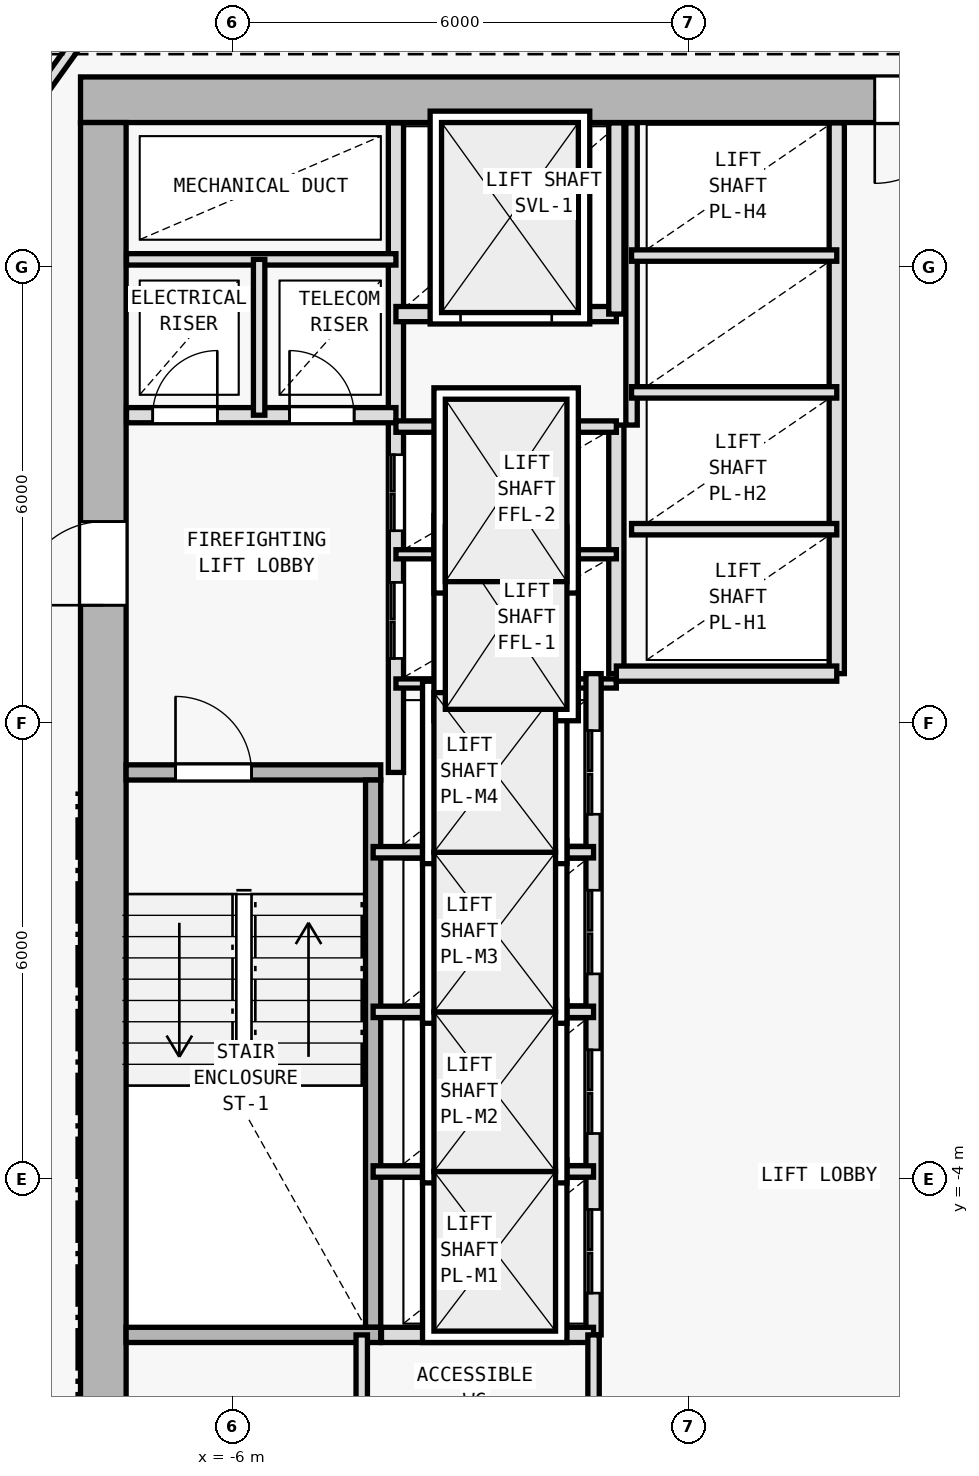
"""IFC4 building model, lengths in metres.
Left out: names, types, materials, properties, quantities, classifications, styles, units other than length and angle.
Written with IfcOpenShell. Run it as: python <this file> out.ifc"""

import sys

from ifc_helpers import new_model, si_unit, direction, frame, frame_2d, origin, origin_2d, place, context, subcontext, project, spatial, rectangle, i_section, extrude, element, fill, save


model = new_model("IFC4")
c1 = context("Model", 3, precision=1e-05, world=origin(), true_north=direction((0.0, 1.0)))
c2 = subcontext(c1, "Body", "Model", "MODEL_VIEW")
j1 = project(units=[si_unit("LENGTHUNIT", "METRE"), si_unit("PLANEANGLEUNIT", "RADIAN")], contexts=[c1])
p1 = place(None, origin())
s1 = spatial("IfcSite", under=j1, at=p1, CompositionType="ELEMENT")
p2 = place(p1, origin())
s2 = spatial("IfcBuilding", under=s1, at=p2, CompositionType="ELEMENT")
p3 = place(p2, frame((0.0, 0.0, 111.3)))
s3 = spatial("IfcBuildingStorey", under=s2, at=p3, CompositionType="ELEMENT", Elevation=111.3)
for number, where, z_axis, x_axis in (
    (1, (-7.7, 10.2, 0.0), (0.0, 0.0, 1.0), (1.0, 0.0, 0.0)),
    (2, (-7.7, 2.0, 0.0), (0.0, 0.0, 1.0), (1.0, 0.0, 0.0)),
):
    element("IfcColumn", number, at=place(p3, frame(where, z_axis=z_axis, x_axis=x_axis)), inside=s3, PredefinedType="COLUMN", context=c2, shape_type="SweptSolid", body=[
        extrude(i_section(OverallWidth=0.409, OverallDepth=0.425, WebThickness=0.021, FlangeThickness=0.034, FilletRadius=0.015, at=origin_2d()), origin(), (0.0, 0.0, 1.0), 3.6),
    ])
p4 = place(p3, frame((8.0, 10.2, 0.0), z_axis=(0.0, 0.0, 1.0), x_axis=(-1.0, 0.0, 0.0)))
e3 = element("IfcWall", 3, at=p4, inside=s3, PredefinedType="SHEAR", context=c2, shape_type="SweptSolid", body=[
    extrude(rectangle(XDim=16.0, YDim=0.6, at=frame_2d((8.0, 0.0))), origin(), (0.0, 0.0, 1.0), 3.35),
])
p5 = place(p4, frame((4.45, 0.0, 0.0)))
e4 = element("IfcOpeningElement", 4, at=p5, cuts=e3, PredefinedType="OPENING", context=c2, shape_type="SweptSolid", body=[
    extrude(rectangle(XDim=1.1, YDim=2.15, at=frame_2d((0.55, 1.075))), frame((0.0, 0.31, 0.0), z_axis=(0.0, -1.0, 0.0), x_axis=(1.0, 0.0, 0.0)), (0.0, 0.0, 1.0), 0.62),
])
p6 = place(p3, frame((-7.7, -9.1, 0.0), z_axis=(0.0, 0.0, 1.0), x_axis=(0.0, 1.0, 0.0)))
e5 = element("IfcWall", 5, at=p6, inside=s3, PredefinedType="SHEAR", context=c2, shape_type="SweptSolid", body=[
    extrude(rectangle(XDim=19.0, YDim=0.6, at=frame_2d((9.5, 0.0))), origin(), (0.0, 0.0, 1.0), 3.35),
])
p7 = place(p6, frame((12.65, 0.0, 0.0)))
e6 = element("IfcOpeningElement", 6, at=p7, cuts=e5, PredefinedType="OPENING", context=c2, shape_type="SweptSolid", body=[
    extrude(rectangle(XDim=1.1, YDim=2.15, at=frame_2d((0.55, 1.075))), frame((0.0, 0.31, 0.0), z_axis=(0.0, -1.0, 0.0), x_axis=(1.0, 0.0, 0.0)), (0.0, 0.0, 1.0), 0.62),
])
p8 = place(p3, frame((-7.4, 1.35, 0.0), z_axis=(0.0, 0.0, 1.0), x_axis=(1.0, 0.0, 0.0)))
e7 = element("IfcWall", 7, at=p8, inside=s3, PredefinedType="SOLIDWALL", context=c2, shape_type="SweptSolid", body=[
    extrude(rectangle(XDim=3.35, YDim=0.2, at=frame_2d((1.675, 0.0))), origin(), (0.0, 0.0, 1.0), 3.35),
])
p9 = place(p8, frame((0.65, 0.0, 0.0)))
e8 = element("IfcOpeningElement", 8, at=p9, cuts=e7, PredefinedType="OPENING", context=c2, shape_type="SweptSolid", body=[
    extrude(rectangle(XDim=1.0, YDim=2.15, at=frame_2d((0.5, 1.075))), frame((0.0, 0.11, 0.0), z_axis=(0.0, -1.0, 0.0), x_axis=(1.0, 0.0, 0.0)), (0.0, 0.0, 1.0), 0.22),
])
p10 = place(p3, frame((-4.15, -5.95, 0.0), z_axis=(0.0, 0.0, 1.0), x_axis=(0.0, 1.0, 0.0)))
e9 = element("IfcWall", 9, at=p10, inside=s3, PredefinedType="SOLIDWALL", context=c2, shape_type="SweptSolid", body=[
    extrude(rectangle(XDim=7.2, YDim=0.2, at=frame_2d((3.6, 0.0))), origin(), (0.0, 0.0, 1.0), 3.35),
])
p11 = place(p3, frame((-3.85, 1.35, 0.0), z_axis=(0.0, 0.0, 1.0), x_axis=(0.0, 1.0, 0.0)))
e10 = element("IfcWall", 10, at=p11, inside=s3, PredefinedType="SOLIDWALL", context=c2, shape_type="SweptSolid", body=[
    extrude(rectangle(XDim=8.545, YDim=0.2, at=frame_2d((4.272, 0.0))), origin(), (0.0, 0.0, 1.0), 3.35),
])
p12 = place(p11, frame((1.5, 0.0, 0.0)))
e11 = element("IfcOpeningElement", 11, at=p12, cuts=e10, PredefinedType="OPENING", context=c2, shape_type="SweptSolid", body=[
    extrude(rectangle(XDim=1.0, YDim=2.15, at=frame_2d((0.5, 1.075))), frame((0.0, 0.11, 0.0), z_axis=(0.0, -1.0, 0.0), x_axis=(1.0, 0.0, 0.0)), (0.0, 0.0, 1.0), 0.22),
])
p13 = place(p11, frame((3.18, 0.0, 0.0)))
e12 = element("IfcOpeningElement", 12, at=p13, cuts=e10, PredefinedType="OPENING", context=c2, shape_type="SweptSolid", body=[
    extrude(rectangle(XDim=1.0, YDim=2.15, at=frame_2d((0.5, 1.075))), frame((0.0, 0.11, 0.0), z_axis=(0.0, -1.0, 0.0), x_axis=(1.0, 0.0, 0.0)), (0.0, 0.0, 1.0), 0.22),
])
p14 = place(p3, frame((-7.395, 6.05, 0.0), z_axis=(0.0, 0.0, 1.0), x_axis=(1.0, 0.0, 0.0)))
e13 = element("IfcWall", 13, at=p14, inside=s3, PredefinedType="SOLIDWALL", context=c2, shape_type="SweptSolid", body=[
    extrude(rectangle(XDim=3.545, YDim=0.2, at=frame_2d((1.772, 0.0))), origin(), (0.0, 0.0, 1.0), 3.35),
])
p15 = place(p14, frame((0.345, 0.0, 0.0)))
e14 = element("IfcOpeningElement", 14, at=p15, cuts=e13, PredefinedType="OPENING", context=c2, shape_type="SweptSolid", body=[
    extrude(rectangle(XDim=0.85, YDim=2.1, at=frame_2d((0.425, 1.05))), frame((0.0, 0.11, 0.0), z_axis=(0.0, -1.0, 0.0), x_axis=(1.0, 0.0, 0.0)), (0.0, 0.0, 1.0), 0.22),
])
p16 = place(p14, frame((2.145, 0.0, 0.0)))
e15 = element("IfcOpeningElement", 15, at=p16, cuts=e13, PredefinedType="OPENING", context=c2, shape_type="SweptSolid", body=[
    extrude(rectangle(XDim=0.85, YDim=2.1, at=frame_2d((0.425, 1.05))), frame((0.0, 0.11, 0.0), z_axis=(0.0, -1.0, 0.0), x_axis=(1.0, 0.0, 0.0)), (0.0, 0.0, 1.0), 0.22),
])
p17 = place(p3, frame((-7.395, 8.1, 0.0), z_axis=(0.0, 0.0, 1.0), x_axis=(1.0, 0.0, 0.0)))
e16 = element("IfcWall", 16, at=p17, inside=s3, PredefinedType="PARTITIONING", context=c2, shape_type="SweptSolid", body=[
    extrude(rectangle(XDim=3.545, YDim=0.15, at=frame_2d((1.772, 0.0))), origin(), (0.0, 0.0, 1.0), 3.35),
])
p18 = place(p3, frame((-5.65, 6.05, 0.0), z_axis=(0.0, 0.0, 1.0), x_axis=(0.0, 1.0, 0.0)))
e17 = element("IfcWall", 17, at=p18, inside=s3, PredefinedType="PARTITIONING", context=c2, shape_type="SweptSolid", body=[
    extrude(rectangle(XDim=2.05, YDim=0.15, at=frame_2d((1.025, 0.0))), origin(), (0.0, 0.0, 1.0), 3.35),
])
p19 = place(p3, frame((-0.95, 2.65, 0.0), z_axis=(0.0, 0.0, 1.0), x_axis=(0.0, 1.0, 0.0)))
e18 = element("IfcWall", 18, at=p19, inside=s3, PredefinedType="SOLIDWALL", context=c2, shape_type="SweptSolid", body=[
    extrude(rectangle(XDim=3.27, YDim=0.2, at=frame_2d((1.635, 0.0))), origin(), (0.0, 0.0, 1.0), 3.35),
])
for number, where, z_axis, x_axis in (
    (19, (-3.85, 2.52, 0.0), (0.0, 0.0, 1.0), (1.0, 0.0, 0.0)),
    (20, (-3.85, 4.22, 0.0), (0.0, 0.0, 1.0), (1.0, 0.0, 0.0)),
):
    element("IfcWall", number, at=place(p3, frame(where, z_axis=z_axis, x_axis=x_axis)), inside=s3, PredefinedType="PARTITIONING", context=c2, shape_type="SweptSolid", body=[
        extrude(rectangle(XDim=2.9, YDim=0.12, at=frame_2d((1.45, 0.0))), origin(), (0.0, 0.0, 1.0), 3.35),
    ])
p20 = place(p3, frame((-3.85, 5.9, 0.0), z_axis=(0.0, 0.0, 1.0), x_axis=(1.0, 0.0, 0.0)))
e21 = element("IfcWall", 21, at=p20, inside=s3, PredefinedType="PARTITIONING", context=c2, shape_type="SweptSolid", body=[
    extrude(rectangle(XDim=2.9, YDim=0.15, at=frame_2d((1.45, 0.0))), origin(), (0.0, 0.0, 1.0), 3.35),
])
p21 = place(p3, frame((-3.85, 7.38, 0.0), z_axis=(0.0, 0.0, 1.0), x_axis=(1.0, 0.0, 0.0)))
e22 = element("IfcWall", 22, at=p21, inside=s3, PredefinedType="SOLIDWALL", context=c2, shape_type="SweptSolid", body=[
    extrude(rectangle(XDim=2.9, YDim=0.2, at=frame_2d((1.45, 0.0))), origin(), (0.0, 0.0, 1.0), 3.35),
])
p22 = place(p21, frame((0.85, 0.0, 0.0)))
e23 = element("IfcOpeningElement", 23, at=p22, cuts=e22, PredefinedType="OPENING", context=c2, shape_type="SweptSolid", body=[
    extrude(rectangle(XDim=1.2, YDim=2.2, at=frame_2d((0.6, 1.1))), frame((0.0, 0.11, 0.0), z_axis=(0.0, -1.0, 0.0), x_axis=(1.0, 0.0, 0.0)), (0.0, 0.0, 1.0), 0.22),
])
p23 = place(p3, frame((-0.95, 7.38, 0.0), z_axis=(0.0, 0.0, 1.0), x_axis=(0.0, 1.0, 0.0)))
e24 = element("IfcWall", 24, at=p23, inside=s3, PredefinedType="SOLIDWALL", context=c2, shape_type="SweptSolid", body=[
    extrude(rectangle(XDim=2.515, YDim=0.2, at=frame_2d((1.258, 0.0))), origin(), (0.0, 0.0, 1.0), 3.35),
])
p24 = place(p3, frame((-1.25, -6.05, 0.0), z_axis=(0.0, 0.0, 1.0), x_axis=(0.0, 1.0, 0.0)))
e25 = element("IfcWall", 25, at=p24, inside=s3, PredefinedType="SOLIDWALL", context=c2, shape_type="SweptSolid", body=[
    extrude(rectangle(XDim=8.7, YDim=0.2, at=frame_2d((4.35, 0.0))), origin(), (0.0, 0.0, 1.0), 3.35),
])
p25 = place(p24, frame((0.55, 0.0, 0.0)))
e26 = element("IfcOpeningElement", 26, at=p25, cuts=e25, PredefinedType="OPENING", context=c2, shape_type="SweptSolid", body=[
    extrude(rectangle(XDim=1.1, YDim=2.15, at=frame_2d((0.55, 1.075))), frame((0.0, 0.11, 0.0), z_axis=(0.0, -1.0, 0.0), x_axis=(1.0, 0.0, 0.0)), (0.0, 0.0, 1.0), 0.22),
])
p26 = place(p24, frame((2.65, 0.0, 0.0)))
e27 = element("IfcOpeningElement", 27, at=p26, cuts=e25, PredefinedType="OPENING", context=c2, shape_type="SweptSolid", body=[
    extrude(rectangle(XDim=1.1, YDim=2.15, at=frame_2d((0.55, 1.075))), frame((0.0, 0.11, 0.0), z_axis=(0.0, -1.0, 0.0), x_axis=(1.0, 0.0, 0.0)), (0.0, 0.0, 1.0), 0.22),
])
p27 = place(p24, frame((4.75, 0.0, 0.0)))
e28 = element("IfcOpeningElement", 28, at=p27, cuts=e25, PredefinedType="OPENING", context=c2, shape_type="SweptSolid", body=[
    extrude(rectangle(XDim=1.1, YDim=2.15, at=frame_2d((0.55, 1.075))), frame((0.0, 0.11, 0.0), z_axis=(0.0, -1.0, 0.0), x_axis=(1.0, 0.0, 0.0)), (0.0, 0.0, 1.0), 0.22),
])
p28 = place(p24, frame((6.85, 0.0, 0.0)))
e29 = element("IfcOpeningElement", 29, at=p28, cuts=e25, PredefinedType="OPENING", context=c2, shape_type="SweptSolid", body=[
    extrude(rectangle(XDim=1.1, YDim=2.15, at=frame_2d((0.55, 1.075))), frame((0.0, 0.11, 0.0), z_axis=(0.0, -1.0, 0.0), x_axis=(1.0, 0.0, 0.0)), (0.0, 0.0, 1.0), 0.22),
])
for number, where, z_axis, x_axis in (
    (30, (-4.15, -3.9, 0.0), (0.0, 0.0, 1.0), (1.0, 0.0, 0.0)),
    (31, (-4.15, -1.8, 0.0), (0.0, 0.0, 1.0), (1.0, 0.0, 0.0)),
    (32, (-4.15, 0.3, 0.0), (0.0, 0.0, 1.0), (1.0, 0.0, 0.0)),
):
    element("IfcWall", number, at=place(p3, frame(where, z_axis=z_axis, x_axis=x_axis)), inside=s3, PredefinedType="PARTITIONING", context=c2, shape_type="SweptSolid", body=[
        extrude(rectangle(XDim=2.9, YDim=0.15, at=frame_2d((1.45, 0.0))), origin(), (0.0, 0.0, 1.0), 3.35),
    ])
p29 = place(p3, frame((1.95, 2.65, 0.0), z_axis=(0.0, 0.0, 1.0), x_axis=(0.0, 1.0, 0.0)))
e33 = element("IfcWall", 33, at=p29, inside=s3, PredefinedType="SOLIDWALL", context=c2, shape_type="SweptSolid", body=[
    extrude(rectangle(XDim=7.245, YDim=0.2, at=frame_2d((3.623, 0.0))), origin(), (0.0, 0.0, 1.0), 3.35),
])
p30 = place(p3, frame((-0.95, 2.65, 0.0), z_axis=(0.0, 0.0, 1.0), x_axis=(1.0, 0.0, 0.0)))
e34 = element("IfcWall", 34, at=p30, inside=s3, PredefinedType="SOLIDWALL", context=c2, shape_type="SweptSolid", body=[
    extrude(rectangle(XDim=2.9, YDim=0.2, at=frame_2d((1.45, 0.0))), origin(), (0.0, 0.0, 1.0), 3.35),
])
p31 = place(p3, frame((-0.75, 5.92, 0.0), z_axis=(0.0, 0.0, 1.0), x_axis=(0.0, 1.0, 0.0)))
e35 = element("IfcWall", 35, at=p31, inside=s3, PredefinedType="PARTITIONING", context=c2, shape_type="SweptSolid", body=[
    extrude(rectangle(XDim=3.975, YDim=0.15, at=frame_2d((1.988, 0.0))), origin(), (0.0, 0.0, 1.0), 3.35),
])
for number, where, z_axis, x_axis in (
    (36, (-0.75, 4.55, 0.0), (0.0, 0.0, 1.0), (1.0, 0.0, 0.0)),
    (37, (-0.75, 6.35, 0.0), (0.0, 0.0, 1.0), (1.0, 0.0, 0.0)),
    (38, (-0.75, 8.15, 0.0), (0.0, 0.0, 1.0), (1.0, 0.0, 0.0)),
):
    element("IfcWall", number, at=place(p3, frame(where, z_axis=z_axis, x_axis=x_axis)), inside=s3, PredefinedType="PARTITIONING", context=c2, shape_type="SweptSolid", body=[
        extrude(rectangle(XDim=2.7, YDim=0.15, at=frame_2d((1.35, 0.0))), origin(), (0.0, 0.0, 1.0), 3.35),
    ])
p32 = place(p3, frame((-7.4, -6.05, 0.0), z_axis=(0.0, 0.0, 1.0), x_axis=(1.0, 0.0, 0.0)))
e39 = element("IfcWall", 39, at=p32, inside=s3, PredefinedType="SOLIDWALL", context=c2, shape_type="SweptSolid", body=[
    extrude(rectangle(XDim=3.35, YDim=0.2, at=frame_2d((1.675, 0.0))), origin(), (0.0, 0.0, 1.0), 3.35),
])
p33 = place(p3, frame((-4.04, -6.05, 0.0), z_axis=(0.0, 0.0, 1.0), x_axis=(1.0, 0.0, 0.0)))
e40 = element("IfcWall", 40, at=p33, inside=s3, PredefinedType="SOLIDWALL", context=c2, shape_type="SweptSolid", body=[
    extrude(rectangle(XDim=2.79, YDim=0.2, at=frame_2d((1.395, 0.0))), origin(), (0.0, 0.0, 1.0), 3.35),
])
p34 = place(p3, frame((-1.25, -9.095, 0.0), z_axis=(0.0, 0.0, 1.0), x_axis=(0.0, 1.0, 0.0)))
e41 = element("IfcWall", 41, at=p34, inside=s3, PredefinedType="PARTITIONING", context=c2, shape_type="SweptSolid", body=[
    extrude(rectangle(XDim=3.045, YDim=0.15, at=frame_2d((1.522, 0.0))), origin(), (0.0, 0.0, 1.0), 3.35),
])
p35 = place(p34, frame((0.845, 0.0, 0.0)))
e42 = element("IfcOpeningElement", 42, at=p35, cuts=e41, PredefinedType="OPENING", context=c2, shape_type="SweptSolid", body=[
    extrude(rectangle(XDim=0.95, YDim=2.1, at=frame_2d((0.475, 1.05))), frame((0.0, 0.085, 0.0), z_axis=(0.0, -1.0, 0.0), x_axis=(1.0, 0.0, 0.0)), (0.0, 0.0, 1.0), 0.17),
])
p36 = place(p3, frame((-4.3, -9.095, 0.0), z_axis=(0.0, 0.0, 1.0), x_axis=(0.0, 1.0, 0.0)))
e43 = element("IfcWall", 43, at=p36, inside=s3, PredefinedType="PARTITIONING", context=c2, shape_type="SweptSolid", body=[
    extrude(rectangle(XDim=3.045, YDim=0.15, at=frame_2d((1.522, 0.0))), origin(), (0.0, 0.0, 1.0), 3.35),
])
p37 = place(p36, frame((0.845, 0.0, 0.0)))
e44 = element("IfcOpeningElement", 44, at=p37, cuts=e43, PredefinedType="OPENING", context=c2, shape_type="SweptSolid", body=[
    extrude(rectangle(XDim=0.9, YDim=2.1, at=frame_2d((0.45, 1.05))), frame((0.0, 0.085, 0.0), z_axis=(0.0, -1.0, 0.0), x_axis=(1.0, 0.0, 0.0)), (0.0, 0.0, 1.0), 0.17),
])
p38 = place(p3, frame((-9.86, 8.426, 0.0), z_axis=(0.0, 0.0, 1.0), x_axis=(0.582449511476, 0.812866881218, 0.0)))
e45 = element("IfcWall", 45, at=p38, inside=s3, PredefinedType="PARTITIONING", context=c2, shape_type="SweptSolid", body=[
    extrude(rectangle(XDim=4.84, YDim=0.15, at=frame_2d((2.42, 0.0))), origin(), (0.0, 0.0, 1.0), 2.825),
])
p39 = place(p7, origin())
e46 = element("IfcDoor", 46, at=p39, inside=s3, OperationType="SINGLE_SWING_LEFT", PredefinedType="DOOR", context=c2, shape_type="SweptSolid", body=[
    extrude(rectangle(XDim=1.1, YDim=2.15, at=frame_2d((0.55, 1.075))), frame((0.0, 0.025, 0.0), z_axis=(0.0, -1.0, 0.0), x_axis=(1.0, 0.0, 0.0)), (0.0, 0.0, 1.0), 0.05),
])
fill(e6, e46)
p40 = place(p5, origin())
e47 = element("IfcDoor", 47, at=p40, inside=s3, OperationType="SINGLE_SWING_RIGHT", PredefinedType="DOOR", context=c2, shape_type="SweptSolid", body=[
    extrude(rectangle(XDim=1.1, YDim=2.15, at=frame_2d((0.55, 1.075))), frame((0.0, 0.025, 0.0), z_axis=(0.0, -1.0, 0.0), x_axis=(1.0, 0.0, 0.0)), (0.0, 0.0, 1.0), 0.05),
])
fill(e4, e47)
p41 = place(p9, origin())
e48 = element("IfcDoor", 48, at=p41, inside=s3, OperationType="SINGLE_SWING_LEFT", PredefinedType="DOOR", context=c2, shape_type="SweptSolid", body=[
    extrude(rectangle(XDim=1.0, YDim=2.15, at=frame_2d((0.5, 1.075))), frame((0.0, 0.025, 0.0), z_axis=(0.0, -1.0, 0.0), x_axis=(1.0, 0.0, 0.0)), (0.0, 0.0, 1.0), 0.05),
])
fill(e8, e48)
p42 = place(p15, origin())
e49 = element("IfcDoor", 49, at=p42, inside=s3, OperationType="SINGLE_SWING_RIGHT", PredefinedType="DOOR", context=c2, shape_type="SweptSolid", body=[
    extrude(rectangle(XDim=0.85, YDim=2.1, at=frame_2d((0.425, 1.05))), frame((0.0, 0.025, 0.0), z_axis=(0.0, -1.0, 0.0), x_axis=(1.0, 0.0, 0.0)), (0.0, 0.0, 1.0), 0.05),
])
fill(e14, e49)
p43 = place(p16, origin())
e50 = element("IfcDoor", 50, at=p43, inside=s3, OperationType="SINGLE_SWING_LEFT", PredefinedType="DOOR", context=c2, shape_type="SweptSolid", body=[
    extrude(rectangle(XDim=0.85, YDim=2.1, at=frame_2d((0.425, 1.05))), frame((0.0, 0.025, 0.0), z_axis=(0.0, -1.0, 0.0), x_axis=(1.0, 0.0, 0.0)), (0.0, 0.0, 1.0), 0.05),
])
fill(e15, e50)
p44 = place(p22, origin())
e51 = element("IfcDoor", 51, at=p44, inside=s3, OperationType="DOUBLE_DOOR_SLIDING", PredefinedType="DOOR", context=c2, shape_type="SweptSolid", body=[
    extrude(rectangle(XDim=1.2, YDim=2.2, at=frame_2d((0.6, 1.1))), frame((0.0, 0.025, 0.0), z_axis=(0.0, -1.0, 0.0), x_axis=(1.0, 0.0, 0.0)), (0.0, 0.0, 1.0), 0.05),
])
fill(e23, e51)
p45 = place(p25, origin())
e52 = element("IfcDoor", 52, at=p45, inside=s3, OperationType="DOUBLE_DOOR_SLIDING", PredefinedType="DOOR", context=c2, shape_type="SweptSolid", body=[
    extrude(rectangle(XDim=1.1, YDim=2.15, at=frame_2d((0.55, 1.075))), frame((0.0, 0.025, 0.0), z_axis=(0.0, -1.0, 0.0), x_axis=(1.0, 0.0, 0.0)), (0.0, 0.0, 1.0), 0.05),
])
fill(e26, e52)
p46 = place(p26, origin())
e53 = element("IfcDoor", 53, at=p46, inside=s3, OperationType="DOUBLE_DOOR_SLIDING", PredefinedType="DOOR", context=c2, shape_type="SweptSolid", body=[
    extrude(rectangle(XDim=1.1, YDim=2.15, at=frame_2d((0.55, 1.075))), frame((0.0, 0.025, 0.0), z_axis=(0.0, -1.0, 0.0), x_axis=(1.0, 0.0, 0.0)), (0.0, 0.0, 1.0), 0.05),
])
fill(e27, e53)
p47 = place(p27, origin())
e54 = element("IfcDoor", 54, at=p47, inside=s3, OperationType="DOUBLE_DOOR_SLIDING", PredefinedType="DOOR", context=c2, shape_type="SweptSolid", body=[
    extrude(rectangle(XDim=1.1, YDim=2.15, at=frame_2d((0.55, 1.075))), frame((0.0, 0.025, 0.0), z_axis=(0.0, -1.0, 0.0), x_axis=(1.0, 0.0, 0.0)), (0.0, 0.0, 1.0), 0.05),
])
fill(e28, e54)
p48 = place(p28, origin())
e55 = element("IfcDoor", 55, at=p48, inside=s3, OperationType="DOUBLE_DOOR_SLIDING", PredefinedType="DOOR", context=c2, shape_type="SweptSolid", body=[
    extrude(rectangle(XDim=1.1, YDim=2.15, at=frame_2d((0.55, 1.075))), frame((0.0, 0.025, 0.0), z_axis=(0.0, -1.0, 0.0), x_axis=(1.0, 0.0, 0.0)), (0.0, 0.0, 1.0), 0.05),
])
fill(e29, e55)
p49 = place(p12, origin())
e56 = element("IfcDoor", 56, at=p49, inside=s3, OperationType="DOUBLE_DOOR_SLIDING", PredefinedType="DOOR", context=c2, shape_type="SweptSolid", body=[
    extrude(rectangle(XDim=1.0, YDim=2.15, at=frame_2d((0.5, 1.075))), frame((0.0, 0.025, 0.0), z_axis=(0.0, -1.0, 0.0), x_axis=(1.0, 0.0, 0.0)), (0.0, 0.0, 1.0), 0.05),
])
fill(e11, e56)
p50 = place(p13, origin())
e57 = element("IfcDoor", 57, at=p50, inside=s3, OperationType="DOUBLE_DOOR_SLIDING", PredefinedType="DOOR", context=c2, shape_type="SweptSolid", body=[
    extrude(rectangle(XDim=1.0, YDim=2.15, at=frame_2d((0.5, 1.075))), frame((0.0, 0.025, 0.0), z_axis=(0.0, -1.0, 0.0), x_axis=(1.0, 0.0, 0.0)), (0.0, 0.0, 1.0), 0.05),
])
fill(e12, e57)
save(model, sys.argv[1])
